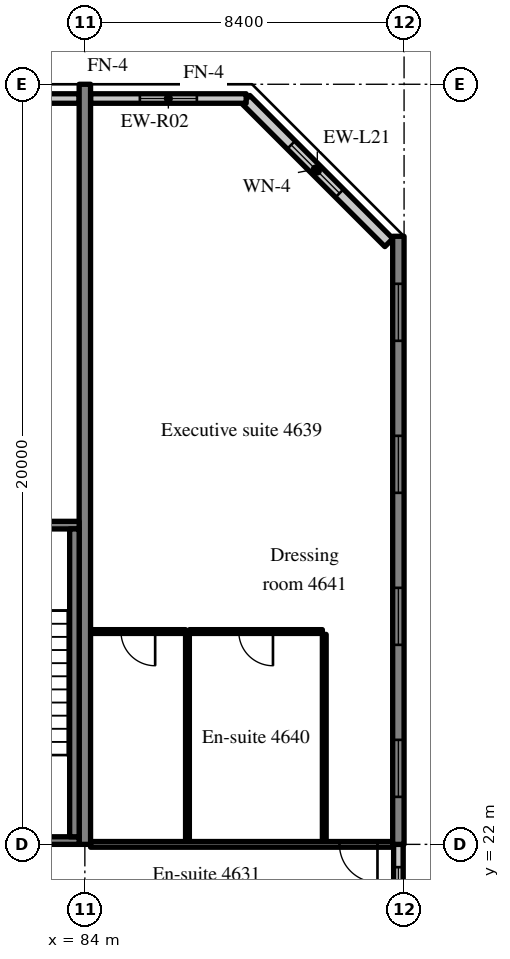
"""IFC4 building model, lengths in metres.
Left out: names, types, materials, properties, quantities, classifications, styles, units other than length and angle.
Written with IfcOpenShell. Run it as: python <this file> out.ifc"""

import sys

from ifc_helpers import new_model, si_unit, direction, frame, frame_2d, origin, place, context, subcontext, project, spatial, rectangle, extrude, source, transform, mapped, element, fill, save


model = new_model("IFC4")
c1 = context("Model", 3, precision=1e-05, world=origin(), true_north=direction((0.0, 1.0)))
c2 = subcontext(c1, "Body", "Model", "MODEL_VIEW")
j1 = project(units=[si_unit("LENGTHUNIT", "METRE"), si_unit("PLANEANGLEUNIT", "RADIAN")], contexts=[c1])
p1 = place(None, origin())
s1 = spatial("IfcSite", under=j1, at=p1, CompositionType="ELEMENT")
p2 = place(p1, origin())
s2 = spatial("IfcBuilding", under=s1, at=p2, CompositionType="ELEMENT")
p3 = place(p2, frame((0.0, 0.0, 189.6)))
s3 = spatial("IfcBuildingStorey", under=s2, at=p3, CompositionType="ELEMENT", Elevation=189.6)
m1 = source(origin(), c2, "Body", "SweptSolid", [
    extrude(rectangle(XDim=20.0, YDim=0.3, at=frame_2d((10.0, 0.0))), origin(), (0.0, 0.0, 1.0), 3.52),
])
p4 = place(p3, frame((84.0, 22.0, 0.0), z_axis=(0.0, 0.0, 1.0), x_axis=(0.0, 1.0, 0.0)))
e1 = element("IfcWall", 1, at=p4, inside=s3, PredefinedType="SHEAR", context=c2, shape_type="MappedRepresentation", body=[
    mapped(m1, transform((0.0, 0.0, 0.0), scale=1.0)),
])
m2 = source(origin(), c2, "Body", "SweptSolid", [
    extrude(rectangle(XDim=16.0, YDim=0.3, at=frame_2d((8.0, 0.0))), origin(), (0.0, 0.0, 1.0), 3.52),
])
p5 = place(p3, frame((92.25, 22.0, 0.0), z_axis=(0.0, 0.0, 1.0), x_axis=(0.0, 1.0, 0.0)))
e2 = element("IfcWall", 2, at=p5, inside=s3, PredefinedType="SHEAR", context=c2, shape_type="MappedRepresentation", body=[
    mapped(m2, transform((0.0, 0.0, 0.0), scale=1.0)),
])
m3 = source(origin(), c2, "Body", "SweptSolid", [
    extrude(rectangle(XDim=1.5, YDim=1.5, at=frame_2d((0.75, 0.75))), frame((0.0, 0.16, 0.0), z_axis=(0.0, -1.0, 0.0), x_axis=(1.0, 0.0, 0.0)), (0.0, 0.0, 1.0), 0.32),
])
p6 = place(p5, frame((1.25, 0.0, 0.9)))
e3 = element("IfcOpeningElement", 3, at=p6, cuts=e2, PredefinedType="OPENING", context=c2, shape_type="MappedRepresentation", body=[
    mapped(m3, transform((0.0, 0.0, 0.0), scale=1.0)),
])
p7 = place(p5, frame((5.25, 0.0, 0.9)))
e4 = element("IfcOpeningElement", 4, at=p7, cuts=e2, PredefinedType="OPENING", context=c2, shape_type="MappedRepresentation", body=[
    mapped(m3, transform((0.0, 0.0, 0.0), scale=1.0)),
])
p8 = place(p5, frame((9.25, 0.0, 0.9)))
e5 = element("IfcOpeningElement", 5, at=p8, cuts=e2, PredefinedType="OPENING", context=c2, shape_type="MappedRepresentation", body=[
    mapped(m3, transform((0.0, 0.0, 0.0), scale=1.0)),
])
p9 = place(p5, frame((13.25, 0.0, 0.9)))
e6 = element("IfcOpeningElement", 6, at=p9, cuts=e2, PredefinedType="OPENING", context=c2, shape_type="MappedRepresentation", body=[
    mapped(m3, transform((0.0, 0.0, 0.0), scale=1.0)),
])
m4 = source(origin(), c2, "Body", "SweptSolid", [
    extrude(rectangle(XDim=5.326, YDim=0.3, at=frame_2d((2.663, 0.0))), origin(), (0.0, 0.0, 1.0), 3.52),
])
p10 = place(p3, frame((92.0, 37.834, 0.0), z_axis=(0.0, 0.0, 1.0), x_axis=(-0.707083859269, 0.707129702361, 0.0)))
e7 = element("IfcWall", 7, at=p10, inside=s3, PredefinedType="SOLIDWALL", context=c2, shape_type="MappedRepresentation", body=[
    mapped(m4, transform((0.0, 0.0, 0.0), scale=1.0)),
])
m5 = source(origin(), c2, "Body", "SweptSolid", [
    extrude(rectangle(XDim=1.8, YDim=1.5, at=frame_2d((0.9, 0.75))), frame((0.0, 0.16, 0.0), z_axis=(0.0, -1.0, 0.0), x_axis=(1.0, 0.0, 0.0)), (0.0, 0.0, 1.0), 0.32),
])
p11 = place(p10, frame((1.836, 0.0, 0.9)))
e8 = element("IfcOpeningElement", 8, at=p11, cuts=e7, PredefinedType="OPENING", context=c2, shape_type="MappedRepresentation", body=[
    mapped(m5, transform((0.0, 0.0, 0.0), scale=1.0)),
])
m6 = source(origin(), c2, "Body", "SweptSolid", [
    extrude(rectangle(XDim=1.708, YDim=0.25, at=frame_2d((0.854, 0.0))), origin(), (0.0, 0.0, 1.0), 2.87),
])
p12 = place(p3, frame((83.85, 41.625, 0.0), z_axis=(0.0, 0.0, 1.0), x_axis=(-1.0, 0.0, 0.0)))
e9 = element("IfcWall", 9, at=p12, inside=s3, PredefinedType="SOLIDWALL", context=c2, shape_type="MappedRepresentation", body=[
    mapped(m6, transform((0.0, 0.0, 0.0), scale=1.0)),
])
m7 = source(origin(), c2, "Body", "SweptSolid", [
    extrude(rectangle(XDim=4.095, YDim=0.25, at=frame_2d((2.047, 0.0))), origin(), (0.0, 0.0, 1.0), 2.87),
])
p13 = place(p3, frame((88.245, 41.625, 0.0), z_axis=(0.0, 0.0, 1.0), x_axis=(-1.0, 0.0, 0.0)))
e10 = element("IfcWall", 10, at=p13, inside=s3, PredefinedType="SOLIDWALL", context=c2, shape_type="MappedRepresentation", body=[
    mapped(m7, transform((0.0, 0.0, 0.0), scale=1.0)),
])
m8 = source(origin(), c2, "Body", "SweptSolid", [
    extrude(rectangle(XDim=1.5, YDim=1.5, at=frame_2d((0.75, 0.75))), frame((0.0, 0.135, 0.0), z_axis=(0.0, -1.0, 0.0), x_axis=(1.0, 0.0, 0.0)), (0.0, 0.0, 1.0), 0.27),
])
p14 = place(p13, frame((1.297, 0.0, 0.9)))
e11 = element("IfcOpeningElement", 11, at=p14, cuts=e10, PredefinedType="OPENING", context=c2, shape_type="MappedRepresentation", body=[
    mapped(m8, transform((0.0, 0.0, 0.0), scale=1.0)),
])
m9 = source(origin(), c2, "Body", "SweptSolid", [
    extrude(rectangle(XDim=2.4, YDim=0.25, at=frame_2d((1.2, 0.0))), origin(), (0.0, 0.0, 1.0), 2.62),
])
p15 = place(p3, frame((92.25, 19.6, 0.0), z_axis=(0.0, 0.0, 1.0), x_axis=(0.0, 1.0, 0.0)))
e12 = element("IfcWall", 12, at=p15, inside=s3, PredefinedType="SOLIDWALL", context=c2, shape_type="MappedRepresentation", body=[
    mapped(m9, transform((0.0, 0.0, 0.0), scale=1.0)),
])
m10 = source(origin(), c2, "Body", "SweptSolid", [
    extrude(rectangle(XDim=1.2, YDim=1.5, at=frame_2d((0.6, 0.75))), frame((0.0, 0.135, 0.0), z_axis=(0.0, -1.0, 0.0), x_axis=(1.0, 0.0, 0.0)), (0.0, 0.0, 1.0), 0.27),
])
p16 = place(p15, frame((0.6, 0.0, 0.9)))
e13 = element("IfcOpeningElement", 13, at=p16, cuts=e12, PredefinedType="OPENING", context=c2, shape_type="MappedRepresentation", body=[
    mapped(m10, transform((0.0, 0.0, 0.0), scale=1.0)),
])
m11 = source(origin(), c2, "Body", "SweptSolid", [
    extrude(rectangle(XDim=8.25, YDim=0.2, at=frame_2d((4.125, 0.0))), origin(), (0.0, 0.0, 1.0), 3.52),
])
p17 = place(p3, frame((83.85, 22.1, 0.0), z_axis=(0.0, 0.0, 1.0), x_axis=(-1.0, 0.0, 0.0)))
e14 = element("IfcWall", 14, at=p17, inside=s3, PredefinedType="SOLIDWALL", context=c2, shape_type="MappedRepresentation", body=[
    mapped(m11, transform((0.0, 0.0, 0.0), scale=1.0)),
])
m12 = source(origin(), c2, "Body", "SweptSolid", [
    extrude(rectangle(XDim=1.2, YDim=2.1, at=frame_2d((0.6, 1.05))), frame((0.0, 0.11, 0.0), z_axis=(0.0, -1.0, 0.0), x_axis=(1.0, 0.0, 0.0)), (0.0, 0.0, 1.0), 0.22),
])
p18 = place(p17, frame((6.05, 0.0, 0.0)))
e15 = element("IfcOpeningElement", 15, at=p18, cuts=e14, PredefinedType="OPENING", context=c2, shape_type="MappedRepresentation", body=[
    mapped(m12, transform((0.0, 0.0, 0.0), scale=1.0)),
])
p19 = place(p3, frame((83.85, 30.4, 0.0), z_axis=(0.0, 0.0, 1.0), x_axis=(-1.0, 0.0, 0.0)))
e16 = element("IfcWall", 16, at=p19, inside=s3, PredefinedType="SOLIDWALL", context=c2, shape_type="MappedRepresentation", body=[
    mapped(m11, transform((0.0, 0.0, 0.0), scale=1.0)),
])
m13 = source(origin(), c2, "Body", "SweptSolid", [
    extrude(rectangle(XDim=1.0, YDim=2.1, at=frame_2d((0.5, 1.05))), frame((0.0, 0.11, 0.0), z_axis=(0.0, -1.0, 0.0), x_axis=(1.0, 0.0, 0.0)), (0.0, 0.0, 1.0), 0.22),
])
p20 = place(p19, frame((6.15, 0.0, 0.0)))
e17 = element("IfcOpeningElement", 17, at=p20, cuts=e16, PredefinedType="OPENING", context=c2, shape_type="MappedRepresentation", body=[
    mapped(m13, transform((0.0, 0.0, 0.0), scale=1.0)),
])
m14 = source(origin(), c2, "Body", "SweptSolid", [
    extrude(rectangle(XDim=8.1, YDim=0.25, at=frame_2d((4.05, 0.0))), origin(), (0.0, 0.0, 1.0), 3.52),
])
p21 = place(p3, frame((83.725, 22.2, 0.0), z_axis=(0.0, 0.0, 1.0), x_axis=(0.0, 1.0, 0.0)))
e18 = element("IfcWall", 18, at=p21, inside=s3, PredefinedType="SOLIDWALL", context=c2, shape_type="MappedRepresentation", body=[
    mapped(m14, transform((0.0, 0.0, 0.0), scale=1.0)),
])
m15 = source(origin(), c2, "Body", "SweptSolid", [
    extrude(rectangle(XDim=5.45, YDim=0.1, at=frame_2d((2.725, 0.0))), origin(), (0.0, 0.0, 1.0), 3.52),
])
for number, where, z_axis, x_axis in (
    (19, (90.3, 22.075, 0.0), (0.0, 0.0, 1.0), (0.0, 1.0, 0.0)),
    (20, (86.7, 22.075, 0.0), (0.0, 0.0, 1.0), (0.0, 1.0, 0.0)),
):
    element("IfcWall", number, at=place(p3, frame(where, z_axis=z_axis, x_axis=x_axis)), inside=s3, PredefinedType="PARTITIONING", context=c2, shape_type="MappedRepresentation", body=[
        mapped(m15, transform((0.0, 0.0, 0.0), scale=1.0)),
    ])
m16 = source(origin(), c2, "Body", "SweptSolid", [
    extrude(rectangle(XDim=3.5, YDim=0.1, at=frame_2d((1.75, 0.0))), origin(), (0.0, 0.0, 1.0), 3.52),
])
p22 = place(p3, frame((86.75, 27.6, 0.0), z_axis=(0.0, 0.0, 1.0), x_axis=(1.0, 0.0, 0.0)))
e21 = element("IfcWall", 21, at=p22, inside=s3, PredefinedType="PARTITIONING", context=c2, shape_type="MappedRepresentation", body=[
    mapped(m16, transform((0.0, 0.0, 0.0), scale=1.0)),
])
m17 = source(origin(), c2, "Body", "SweptSolid", [
    extrude(rectangle(XDim=0.9, YDim=2.1, at=frame_2d((0.45, 1.05))), frame((0.0, 0.06, 0.0), z_axis=(0.0, -1.0, 0.0), x_axis=(1.0, 0.0, 0.0)), (0.0, 0.0, 1.0), 0.12),
])
p23 = place(p22, frame((1.3, 0.0, 0.0)))
e22 = element("IfcOpeningElement", 22, at=p23, cuts=e21, PredefinedType="OPENING", context=c2, shape_type="MappedRepresentation", body=[
    mapped(m17, transform((0.0, 0.0, 0.0), scale=1.0)),
])
m18 = source(origin(), c2, "Body", "SweptSolid", [
    extrude(rectangle(XDim=2.5, YDim=0.1, at=frame_2d((1.25, 0.0))), origin(), (0.0, 0.0, 1.0), 3.52),
])
p24 = place(p3, frame((84.15, 27.6, 0.0), z_axis=(0.0, 0.0, 1.0), x_axis=(1.0, 0.0, 0.0)))
e23 = element("IfcWall", 23, at=p24, inside=s3, PredefinedType="PARTITIONING", context=c2, shape_type="MappedRepresentation", body=[
    mapped(m18, transform((0.0, 0.0, 0.0), scale=1.0)),
])
p25 = place(p24, frame((0.8, 0.0, 0.0)))
e24 = element("IfcOpeningElement", 24, at=p25, cuts=e23, PredefinedType="OPENING", context=c2, shape_type="MappedRepresentation", body=[
    mapped(m17, transform((0.0, 0.0, 0.0), scale=1.0)),
])
m19 = source(origin(), c2, "Body", "SweptSolid", [
    extrude(rectangle(XDim=7.95, YDim=0.15, at=frame_2d((3.975, 0.0))), origin(), (0.0, 0.0, 1.0), 2.82),
])
p26 = place(p3, frame((84.15, 22.0, 0.0), z_axis=(0.0, 0.0, 1.0), x_axis=(1.0, 0.0, 0.0)))
e25 = element("IfcWall", 25, at=p26, inside=s3, PredefinedType="PARTITIONING", context=c2, shape_type="MappedRepresentation", body=[
    mapped(m19, transform((0.0, 0.0, 0.0), scale=1.0)),
])
m20 = source(origin(), c2, "Body", "SweptSolid", [
    extrude(rectangle(XDim=1.0, YDim=2.1, at=frame_2d((0.5, 1.05))), frame((0.0, 0.085, 0.0), z_axis=(0.0, -1.0, 0.0), x_axis=(1.0, 0.0, 0.0)), (0.0, 0.0, 1.0), 0.17),
])
p27 = place(p26, frame((6.55, 0.0, 0.0)))
e26 = element("IfcOpeningElement", 26, at=p27, cuts=e25, PredefinedType="OPENING", context=c2, shape_type="MappedRepresentation", body=[
    mapped(m20, transform((0.0, 0.0, 0.0), scale=1.0)),
])
m21 = source(origin(), c2, "Body", "SweptSolid", [
    extrude(rectangle(XDim=1.8, YDim=1.5, at=frame_2d((0.9, 0.75))), frame((0.0, 0.03, 0.0), z_axis=(0.0, -1.0, 0.0), x_axis=(1.0, 0.0, 0.0)), (0.0, 0.0, 1.0), 0.06),
])
p28 = place(p11, origin())
e27 = element("IfcWindow", 27, at=p28, inside=s3, PartitioningType="SINGLE_PANEL", PredefinedType="WINDOW", context=c2, shape_type="MappedRepresentation", body=[
    mapped(m21, transform((0.0, 0.0, 0.0), scale=1.0)),
])
fill(e8, e27)
m22 = source(origin(), c2, "Body", "SweptSolid", [
    extrude(rectangle(XDim=1.5, YDim=1.5, at=frame_2d((0.75, 0.75))), frame((0.0, 0.03, 0.0), z_axis=(0.0, -1.0, 0.0), x_axis=(1.0, 0.0, 0.0)), (0.0, 0.0, 1.0), 0.06),
])
p29 = place(p14, origin())
e28 = element("IfcWindow", 28, at=p29, inside=s3, PartitioningType="SINGLE_PANEL", PredefinedType="WINDOW", context=c2, shape_type="MappedRepresentation", body=[
    mapped(m22, transform((0.0, 0.0, 0.0), scale=1.0)),
])
fill(e11, e28)
p30 = place(p6, origin())
e29 = element("IfcWindow", 29, at=p30, inside=s3, PartitioningType="SINGLE_PANEL", PredefinedType="WINDOW", context=c2, shape_type="MappedRepresentation", body=[
    mapped(m22, transform((0.0, 0.0, 0.0), scale=1.0)),
])
fill(e3, e29)
p31 = place(p7, origin())
e30 = element("IfcWindow", 30, at=p31, inside=s3, PartitioningType="SINGLE_PANEL", PredefinedType="WINDOW", context=c2, shape_type="MappedRepresentation", body=[
    mapped(m22, transform((0.0, 0.0, 0.0), scale=1.0)),
])
fill(e4, e30)
p32 = place(p8, origin())
e31 = element("IfcWindow", 31, at=p32, inside=s3, PartitioningType="SINGLE_PANEL", PredefinedType="WINDOW", context=c2, shape_type="MappedRepresentation", body=[
    mapped(m22, transform((0.0, 0.0, 0.0), scale=1.0)),
])
fill(e5, e31)
p33 = place(p9, origin())
e32 = element("IfcWindow", 32, at=p33, inside=s3, PartitioningType="SINGLE_PANEL", PredefinedType="WINDOW", context=c2, shape_type="MappedRepresentation", body=[
    mapped(m22, transform((0.0, 0.0, 0.0), scale=1.0)),
])
fill(e6, e32)
m23 = source(origin(), c2, "Body", "SweptSolid", [
    extrude(rectangle(XDim=1.2, YDim=1.5, at=frame_2d((0.6, 0.75))), frame((0.0, 0.03, 0.0), z_axis=(0.0, -1.0, 0.0), x_axis=(1.0, 0.0, 0.0)), (0.0, 0.0, 1.0), 0.06),
])
p34 = place(p16, origin())
e33 = element("IfcWindow", 33, at=p34, inside=s3, PartitioningType="SINGLE_PANEL", PredefinedType="WINDOW", context=c2, shape_type="MappedRepresentation", body=[
    mapped(m23, transform((0.0, 0.0, 0.0), scale=1.0)),
])
fill(e13, e33)
m24 = source(origin(), c2, "Body", "SweptSolid", [
    extrude(rectangle(XDim=0.9, YDim=2.1, at=frame_2d((0.45, 1.05))), frame((0.0, 0.025, 0.0), z_axis=(0.0, -1.0, 0.0), x_axis=(1.0, 0.0, 0.0)), (0.0, 0.0, 1.0), 0.05),
])
p35 = place(p23, origin())
e34 = element("IfcDoor", 34, at=p35, inside=s3, OperationType="SINGLE_SWING_RIGHT", PredefinedType="DOOR", context=c2, shape_type="MappedRepresentation", body=[
    mapped(m24, transform((0.0, 0.0, 0.0), scale=1.0)),
])
fill(e22, e34)
p36 = place(p25, origin())
e35 = element("IfcDoor", 35, at=p36, inside=s3, OperationType="SINGLE_SWING_RIGHT", PredefinedType="DOOR", context=c2, shape_type="MappedRepresentation", body=[
    mapped(m24, transform((0.0, 0.0, 0.0), scale=1.0)),
])
fill(e24, e35)
m25 = source(origin(), c2, "Body", "SweptSolid", [
    extrude(rectangle(XDim=1.0, YDim=2.1, at=frame_2d((0.5, 1.05))), frame((0.0, 0.025, 0.0), z_axis=(0.0, -1.0, 0.0), x_axis=(1.0, 0.0, 0.0)), (0.0, 0.0, 1.0), 0.05),
])
p37 = place(p27, origin())
e36 = element("IfcDoor", 36, at=p37, inside=s3, OperationType="SINGLE_SWING_RIGHT", PredefinedType="DOOR", context=c2, shape_type="MappedRepresentation", body=[
    mapped(m25, transform((0.0, 0.0, 0.0), scale=1.0)),
])
fill(e26, e36)
save(model, sys.argv[1])
